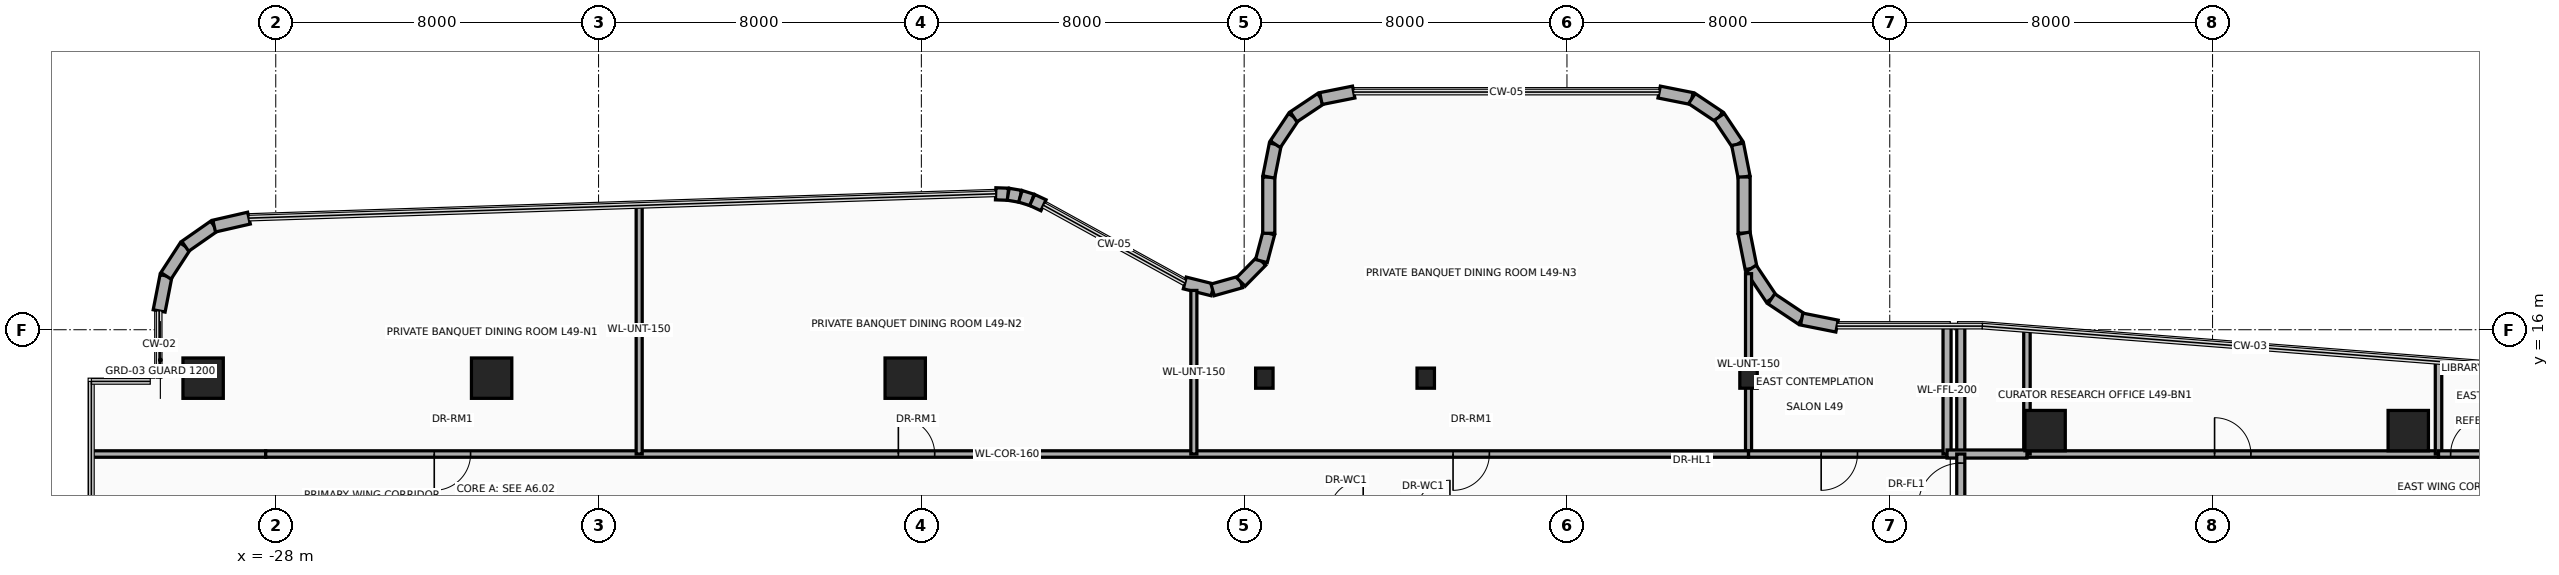
"""IFC4 building model, lengths in metres.
Left out: names, types, materials, properties, quantities, classifications, styles, units other than length and angle.
Written with IfcOpenShell. Run it as: python <this file> out.ifc"""

import sys

from ifc_helpers import new_model, si_unit, direction, frame, frame_2d, origin, origin_2d, place, context, subcontext, project, spatial, rectangle, i_section, extrude, source, transform, mapped, element, fill, save


model = new_model("IFC4")
c1 = context("Model", 3, precision=1e-05, world=origin(), true_north=direction((0.0, 1.0)))
c2 = subcontext(c1, "Body", "Model", "MODEL_VIEW")
j1 = project(units=[si_unit("LENGTHUNIT", "METRE"), si_unit("PLANEANGLEUNIT", "RADIAN")], contexts=[c1])
p1 = place(None, origin())
s1 = spatial("IfcSite", under=j1, at=p1, CompositionType="ELEMENT")
p2 = place(p1, origin())
s2 = spatial("IfcBuilding", under=s1, at=p2, CompositionType="ELEMENT")
p3 = place(p2, frame((0.0, 0.0, 192.35)))
s3 = spatial("IfcBuildingStorey", under=s2, at=p3, CompositionType="ELEMENT", Elevation=192.35)
m1 = source(origin(), c2, "Body", "SweptSolid", [
    extrude(rectangle(XDim=1.0, YDim=1.0, at=origin_2d()), origin(), (0.0, 0.0, 1.0), 3.95),
])
for number, where, z_axis, x_axis in (
    (1, (-29.8, 14.8, 0.0), (0.0, 0.0, 1.0), (1.0, 0.0, 0.0)),
    (2, (-22.65, 14.8, 0.0), (0.0, 0.0, 1.0), (1.0, 0.0, 0.0)),
    (3, (-12.4, 14.8, 0.0), (0.0, 0.0, 1.0), (1.0, 0.0, 0.0)),
    (4, (15.85, 13.5, 0.0), (0.0, 0.0, 1.0), (1.0, 0.0, 0.0)),
    (5, (24.85, 13.5, 0.0), (0.0, 0.0, 1.0), (1.0, 0.0, 0.0)),
):
    element("IfcColumn", number, at=place(p3, frame(where, z_axis=z_axis, x_axis=x_axis)), inside=s3, PredefinedType="COLUMN", context=c2, shape_type="MappedRepresentation", body=[
        mapped(m1, transform((0.0, 0.0, 0.0), x_axis=(1.0, 0.0, 0.0), y_axis=(0.0, 1.0, 0.0), z_axis=(0.0, 0.0, 1.0), scale=1.0)),
    ])
m2 = source(origin(), c2, "Body", "SweptSolid", [
    extrude(i_section(OverallWidth=0.432, OverallDepth=0.498, WebThickness=0.056, FlangeThickness=0.089, at=origin_2d()), origin(), (0.0, 0.0, 1.0), 3.95),
])
for number, where, z_axis, x_axis in (
    (6, (-3.5, 14.8, 0.0), (0.0, 0.0, 1.0), (1.0, 0.0, 0.0)),
    (7, (8.5, 14.8, 0.0), (0.0, 0.0, 1.0), (1.0, 0.0, 0.0)),
    (8, (0.5, 14.8, 0.0), (0.0, 0.0, 1.0), (1.0, 0.0, 0.0)),
):
    element("IfcColumn", number, at=place(p3, frame(where, z_axis=z_axis, x_axis=x_axis)), inside=s3, PredefinedType="COLUMN", context=c2, shape_type="MappedRepresentation", body=[
        mapped(m2, transform((0.0, 0.0, 0.0), x_axis=(1.0, 0.0, 0.0), y_axis=(0.0, 1.0, 0.0), z_axis=(0.0, 0.0, 1.0), scale=1.0)),
    ])
p4 = place(p3, frame((-30.89, 16.466, 0.0), z_axis=(0.0, 0.0, 1.0), x_axis=(0.191128020887, 0.981565117367, 0.0)))
e9 = element("IfcWall", 9, at=p4, inside=s3, PredefinedType="SOLIDWALL", context=c2, shape_type="SweptSolid", body=[
    extrude(rectangle(XDim=0.885, YDim=0.3, at=frame_2d((0.443, 0.0))), origin(), (0.0, 0.0, 1.0), 3.71),
])
p5 = place(p3, frame((-30.721, 17.335, 0.0), z_axis=(0.0, 0.0, 1.0), x_axis=(0.545322000684, 0.838226649284, 0.0)))
e10 = element("IfcWall", 10, at=p5, inside=s3, PredefinedType="SOLIDWALL", context=c2, shape_type="SweptSolid", body=[
    extrude(rectangle(XDim=0.874, YDim=0.3, at=frame_2d((0.437, 0.0))), origin(), (0.0, 0.0, 1.0), 3.71),
])
p6 = place(p3, frame((-30.244, 18.068, 0.0), z_axis=(0.0, 0.0, 1.0), x_axis=(0.820005059444, 0.572356272339, 0.0)))
e11 = element("IfcWall", 11, at=p6, inside=s3, PredefinedType="SOLIDWALL", context=c2, shape_type="SweptSolid", body=[
    extrude(rectangle(XDim=0.875, YDim=0.3, at=frame_2d((0.437, 0.0))), origin(), (0.0, 0.0, 1.0), 3.71),
])
p7 = place(p3, frame((-29.527, 18.569, 0.0), z_axis=(0.0, 0.0, 1.0), x_axis=(0.974798570829, 0.223086858218, 0.0)))
e12 = element("IfcWall", 12, at=p7, inside=s3, PredefinedType="SOLIDWALL", context=c2, shape_type="SweptSolid", body=[
    extrude(rectangle(XDim=0.885, YDim=0.3, at=frame_2d((0.443, 0.0))), origin(), (0.0, 0.0, 1.0), 3.71),
])
p8 = place(p3, frame((-10.158, 19.368, 0.0), z_axis=(0.0, 0.0, 1.0), x_axis=(0.999425494718, -0.03389218949, 0.0)))
e13 = element("IfcWall", 13, at=p8, inside=s3, PredefinedType="SOLIDWALL", context=c2, shape_type="SweptSolid", body=[
    extrude(rectangle(XDim=0.31, YDim=0.3, at=frame_2d((0.155, 0.0))), origin(), (0.0, 0.0, 1.0), 3.71),
])
for number, where, z_axis, x_axis in (
    (14, (-9.848, 19.358, 0.0), (0.0, 0.0, 1.0), (0.986, -0.167, 0.0)),
    (15, (-9.546, 19.307, 0.0), (0.0, 0.0, 1.0), (0.955, -0.297, 0.0)),
):
    element("IfcWall", number, at=place(p3, frame(where, z_axis=z_axis, x_axis=x_axis)), inside=s3, PredefinedType="SOLIDWALL", context=c2, shape_type="SweptSolid", body=[
        extrude(rectangle(XDim=0.306, YDim=0.3, at=frame_2d((0.153, 0.0))), origin(), (0.0, 0.0, 1.0), 3.71),
    ])
p9 = place(p3, frame((-9.254, 19.216, 0.0), z_axis=(0.0, 0.0, 1.0), x_axis=(0.906524902388, -0.42215234377, 0.0)))
e16 = element("IfcWall", 16, at=p9, inside=s3, PredefinedType="SOLIDWALL", context=c2, shape_type="SweptSolid", body=[
    extrude(rectangle(XDim=0.31, YDim=0.3, at=frame_2d((0.155, 0.0))), origin(), (0.0, 0.0, 1.0), 3.71),
])
p10 = place(p3, frame((-5.472, 17.159, 0.0), z_axis=(0.0, 0.0, 1.0), x_axis=(0.970564820059, -0.240840050789, 0.0)))
e17 = element("IfcWall", 17, at=p10, inside=s3, PredefinedType="SOLIDWALL", context=c2, shape_type="SweptSolid", body=[
    extrude(rectangle(XDim=0.712, YDim=0.3, at=frame_2d((0.356, 0.0))), origin(), (0.0, 0.0, 1.0), 3.71),
])
p11 = place(p3, frame((-4.781, 16.987, 0.0), z_axis=(0.0, 0.0, 1.0), x_axis=(0.962494705656, 0.271300463662, 0.0)))
e18 = element("IfcWall", 18, at=p11, inside=s3, PredefinedType="SOLIDWALL", context=c2, shape_type="SweptSolid", body=[
    extrude(rectangle(XDim=0.726, YDim=0.3, at=frame_2d((0.363, 0.0))), origin(), (0.0, 0.0, 1.0), 3.71),
])
p12 = place(p3, frame((-4.082, 17.184, 0.0), z_axis=(0.0, 0.0, 1.0), x_axis=(0.701538604215, 0.712631452293, 0.0)))
e19 = element("IfcWall", 19, at=p12, inside=s3, PredefinedType="SOLIDWALL", context=c2, shape_type="SweptSolid", body=[
    extrude(rectangle(XDim=0.726, YDim=0.3, at=frame_2d((0.363, 0.0))), origin(), (0.0, 0.0, 1.0), 2.695),
])
p13 = place(p3, frame((-3.573, 17.702, 0.0), z_axis=(0.0, 0.0, 1.0), x_axis=(0.256637481794, 0.966507735581, 0.0)))
e20 = element("IfcWall", 20, at=p13, inside=s3, PredefinedType="SOLIDWALL", context=c2, shape_type="SweptSolid", body=[
    extrude(rectangle(XDim=0.712, YDim=0.3, at=frame_2d((0.356, 0.0))), origin(), (0.0, 0.0, 1.0), 2.695),
])
p14 = place(p3, frame((-3.39, 18.39, 0.0), z_axis=(0.0, 0.0, 1.0), x_axis=(0.0, 1.0, 0.0)))
e21 = element("IfcWall", 21, at=p14, inside=s3, PredefinedType="SOLIDWALL", context=c2, shape_type="SweptSolid", body=[
    extrude(rectangle(XDim=1.396, YDim=0.3, at=frame_2d((0.698, 0.0))), origin(), (0.0, 0.0, 1.0), 2.695),
])
p15 = place(p3, frame((-3.39, 19.785, 0.0), z_axis=(0.0, 0.0, 1.0), x_axis=(0.195094354541, 0.980784478276, 0.0)))
e22 = element("IfcWall", 22, at=p15, inside=s3, PredefinedType="SOLIDWALL", context=c2, shape_type="SweptSolid", body=[
    extrude(rectangle(XDim=0.827, YDim=0.3, at=frame_2d((0.414, 0.0))), origin(), (0.0, 0.0, 1.0), 2.695),
])
p16 = place(p3, frame((-3.229, 20.596, 0.0), z_axis=(0.0, 0.0, 1.0), x_axis=(0.55545926088, 0.831543750805, 0.0)))
e23 = element("IfcWall", 23, at=p16, inside=s3, PredefinedType="SOLIDWALL", context=c2, shape_type="SweptSolid", body=[
    extrude(rectangle(XDim=0.816, YDim=0.3, at=frame_2d((0.408, 0.0))), origin(), (0.0, 0.0, 1.0), 2.695),
])
p17 = place(p3, frame((-2.775, 21.275, 0.0), z_axis=(0.0, 0.0, 1.0), x_axis=(0.831543750805, 0.55545926088, 0.0)))
e24 = element("IfcWall", 24, at=p17, inside=s3, PredefinedType="SOLIDWALL", context=c2, shape_type="SweptSolid", body=[
    extrude(rectangle(XDim=0.816, YDim=0.3, at=frame_2d((0.408, 0.0))), origin(), (0.0, 0.0, 1.0), 3.71),
])
for number, where, z_axis, x_axis in (
    (25, (-2.096, 21.729, 0.0), (0.0, 0.0, 1.0), (0.981, 0.195, 0.0)),
    (26, (6.285, 21.89, 0.0), (0.0, 0.0, 1.0), (0.981, -0.195, 0.0)),
):
    element("IfcWall", number, at=place(p3, frame(where, z_axis=z_axis, x_axis=x_axis)), inside=s3, PredefinedType="SOLIDWALL", context=c2, shape_type="SweptSolid", body=[
        extrude(rectangle(XDim=0.827, YDim=0.3, at=frame_2d((0.414, 0.0))), origin(), (0.0, 0.0, 1.0), 3.156),
    ])
p18 = place(p3, frame((7.096, 21.729, 0.0), z_axis=(0.0, 0.0, 1.0), x_axis=(0.831543750805, -0.55545926088, 0.0)))
e27 = element("IfcWall", 27, at=p18, inside=s3, PredefinedType="SOLIDWALL", context=c2, shape_type="SweptSolid", body=[
    extrude(rectangle(XDim=0.816, YDim=0.3, at=frame_2d((0.408, 0.0))), origin(), (0.0, 0.0, 1.0), 3.71),
])
p19 = place(p3, frame((7.775, 21.275, 0.0), z_axis=(0.0, 0.0, 1.0), x_axis=(0.55545926088, -0.831543750805, 0.0)))
e28 = element("IfcWall", 28, at=p19, inside=s3, PredefinedType="SOLIDWALL", context=c2, shape_type="SweptSolid", body=[
    extrude(rectangle(XDim=0.816, YDim=0.3, at=frame_2d((0.408, 0.0))), origin(), (0.0, 0.0, 1.0), 2.695),
])
p20 = place(p3, frame((8.229, 20.596, 0.0), z_axis=(0.0, 0.0, 1.0), x_axis=(0.195094354541, -0.980784478276, 0.0)))
e29 = element("IfcWall", 29, at=p20, inside=s3, PredefinedType="SOLIDWALL", context=c2, shape_type="SweptSolid", body=[
    extrude(rectangle(XDim=0.827, YDim=0.3, at=frame_2d((0.414, 0.0))), origin(), (0.0, 0.0, 1.0), 2.695),
])
p21 = place(p3, frame((8.39, 19.785, 0.0), z_axis=(0.0, 0.0, 1.0), x_axis=(0.0, -1.0, 0.0)))
e30 = element("IfcWall", 30, at=p21, inside=s3, PredefinedType="SOLIDWALL", context=c2, shape_type="SweptSolid", body=[
    extrude(rectangle(XDim=1.392, YDim=0.3, at=frame_2d((0.696, 0.0))), origin(), (0.0, 0.0, 1.0), 2.695),
])
p22 = place(p3, frame((8.39, 18.393, 0.0), z_axis=(0.0, 0.0, 1.0), x_axis=(0.195222179208, -0.980759043163, 0.0)))
e31 = element("IfcWall", 31, at=p22, inside=s3, PredefinedType="SOLIDWALL", context=c2, shape_type="SweptSolid", body=[
    extrude(rectangle(XDim=0.893, YDim=0.3, at=frame_2d((0.446, 0.0))), origin(), (0.0, 0.0, 1.0), 2.695),
])
for number, where, z_axis, x_axis in (
    (32, (8.564, 17.518, 0.0), (0.0, 0.0, 1.0), (0.555, -0.832, 0.0)),
    (33, (9.066, 16.766, 0.0), (0.0, 0.0, 1.0), (0.832, -0.555, 0.0)),
):
    element("IfcWall", number, at=place(p3, frame(where, z_axis=z_axis, x_axis=x_axis)), inside=s3, PredefinedType="SOLIDWALL", context=c2, shape_type="SweptSolid", body=[
        extrude(rectangle(XDim=0.904, YDim=0.3, at=frame_2d((0.452, 0.0))), origin(), (0.0, 0.0, 1.0), 2.695),
    ])
p23 = place(p3, frame((9.818, 16.264, 0.0), z_axis=(0.0, 0.0, 1.0), x_axis=(0.980800964186, -0.195011457743, 0.0)))
e34 = element("IfcWall", 34, at=p23, inside=s3, PredefinedType="SOLIDWALL", context=c2, shape_type="SweptSolid", body=[
    extrude(rectangle(XDim=0.893, YDim=0.3, at=frame_2d((0.446, 0.0))), origin(), (0.0, 0.0, 1.0), 3.71),
])
p24 = place(p3, frame((8.5, 12.92, 0.0), z_axis=(0.0, 0.0, 1.0), x_axis=(0.0, 1.0, 0.0)))
e35 = element("IfcWall", 35, at=p24, inside=s3, PredefinedType="PARTITIONING", context=c2, shape_type="SweptSolid", body=[
    extrude(rectangle(XDim=4.469, YDim=0.15, at=frame_2d((2.234, 0.0))), origin(), (0.0, 0.0, 1.0), 2.695),
])
p25 = place(p3, frame((-32.54, 12.92, 0.0), z_axis=(0.0, 0.0, 1.0), x_axis=(1.0, 0.0, 0.0)))
e36 = element("IfcWall", 36, at=p25, inside=s3, PredefinedType="PARTITIONING", context=c2, shape_type="SweptSolid", body=[
    extrude(rectangle(XDim=4.29, YDim=0.16, at=frame_2d((2.145, 0.0))), origin(), (0.0, 0.0, 1.0), 3.156),
])
p26 = place(p3, frame((-28.25, 12.92, 0.0), z_axis=(0.0, 0.0, 1.0), x_axis=(1.0, 0.0, 0.0)))
e37 = element("IfcWall", 37, at=p26, inside=s3, PredefinedType="PARTITIONING", context=c2, shape_type="SweptSolid", body=[
    extrude(rectangle(XDim=36.75, YDim=0.16, at=frame_2d((18.375, 0.0))), origin(), (0.0, 0.0, 1.0), 2.695),
])
p27 = place(p26, frame((4.178, 0.0, 0.0)))
e38 = element("IfcOpeningElement", 38, at=p27, cuts=e37, PredefinedType="OPENING", context=c2, shape_type="SweptSolid", body=[
    extrude(rectangle(XDim=0.9, YDim=2.1, at=frame_2d((0.45, 1.05))), frame((0.0, 0.095, 0.0), z_axis=(0.0, -1.0, 0.0), x_axis=(1.0, 0.0, 0.0)), (0.0, 0.0, 1.0), 0.19),
])
p28 = place(p26, frame((15.68, 0.0, 0.0)))
e39 = element("IfcOpeningElement", 39, at=p28, cuts=e37, PredefinedType="OPENING", context=c2, shape_type="SweptSolid", body=[
    extrude(rectangle(XDim=0.9, YDim=2.1, at=frame_2d((0.45, 1.05))), frame((0.0, 0.095, 0.0), z_axis=(0.0, -1.0, 0.0), x_axis=(1.0, 0.0, 0.0)), (0.0, 0.0, 1.0), 0.19),
])
p29 = place(p26, frame((29.427, 0.0, 0.0)))
e40 = element("IfcOpeningElement", 40, at=p29, cuts=e37, PredefinedType="OPENING", context=c2, shape_type="SweptSolid", body=[
    extrude(rectangle(XDim=0.9, YDim=2.1, at=frame_2d((0.45, 1.05))), frame((0.0, 0.095, 0.0), z_axis=(0.0, -1.0, 0.0), x_axis=(1.0, 0.0, 0.0)), (0.0, 0.0, 1.0), 0.19),
])
p30 = place(p3, frame((-18.993, 12.92, 0.0), z_axis=(0.0, 0.0, 1.0), x_axis=(0.0, 1.0, 0.0)))
e41 = element("IfcWall", 41, at=p30, inside=s3, PredefinedType="PARTITIONING", context=c2, shape_type="SweptSolid", body=[
    extrude(rectangle(XDim=6.161, YDim=0.15, at=frame_2d((3.081, 0.0))), origin(), (0.0, 0.0, 1.0), 2.994),
])
p31 = place(p3, frame((-5.247, 12.92, 0.0), z_axis=(0.0, 0.0, 1.0), x_axis=(0.0, 1.0, 0.0)))
e42 = element("IfcWall", 42, at=p31, inside=s3, PredefinedType="PARTITIONING", context=c2, shape_type="SweptSolid", body=[
    extrude(rectangle(XDim=4.054, YDim=0.15, at=frame_2d((2.027, 0.0))), origin(), (0.0, 0.0, 1.0), 2.495),
])
p32 = place(p3, frame((8.5, 12.92, 0.0), z_axis=(0.0, 0.0, 1.0), x_axis=(1.0, 0.0, 0.0)))
e43 = element("IfcWall", 43, at=p32, inside=s3, PredefinedType="PARTITIONING", context=c2, shape_type="SweptSolid", body=[
    extrude(rectangle(XDim=4.92, YDim=0.16, at=frame_2d((2.46, 0.0))), origin(), (0.0, 0.0, 1.0), 2.695),
])
p33 = place(p32, frame((1.8, 0.0, 0.0)))
e44 = element("IfcOpeningElement", 44, at=p33, cuts=e43, PredefinedType="OPENING", context=c2, shape_type="SweptSolid", body=[
    extrude(rectangle(XDim=0.9, YDim=2.1, at=frame_2d((0.45, 1.05))), frame((0.0, 0.095, 0.0), z_axis=(0.0, -1.0, 0.0), x_axis=(1.0, 0.0, 0.0)), (0.0, 0.0, 1.0), 0.19),
])
for number, where, z_axis, x_axis in (
    (45, (13.42, 12.92, 0.0), (0.0, 0.0, 1.0), (0.0, 1.0, 0.0)),
    (46, (13.76, 12.92, 0.0), (0.0, 0.0, 1.0), (0.0, 1.0, 0.0)),
):
    element("IfcWall", number, at=place(p3, frame(where, z_axis=z_axis, x_axis=x_axis)), inside=s3, PredefinedType="PARTITIONING", context=c2, shape_type="SweptSolid", body=[
        extrude(rectangle(XDim=3.17, YDim=0.2, at=frame_2d((1.585, 0.0))), origin(), (0.0, 0.0, 1.0), 2.994),
    ])
p34 = place(p3, frame((15.4, 12.92, 0.0), z_axis=(0.0, 0.0, 1.0), x_axis=(1.0, 0.0, 0.0)))
e47 = element("IfcWall", 47, at=p34, inside=s3, PredefinedType="PARTITIONING", context=c2, shape_type="SweptSolid", body=[
    extrude(rectangle(XDim=10.2, YDim=0.16, at=frame_2d((5.1, 0.0))), origin(), (0.0, 0.0, 1.0), 3.084),
])
p35 = place(p34, frame((4.65, 0.0, 0.0)))
e48 = element("IfcOpeningElement", 48, at=p35, cuts=e47, PredefinedType="OPENING", context=c2, shape_type="SweptSolid", body=[
    extrude(rectangle(XDim=0.9, YDim=2.1, at=frame_2d((0.45, 1.05))), frame((0.0, 0.095, 0.0), z_axis=(0.0, -1.0, 0.0), x_axis=(1.0, 0.0, 0.0)), (0.0, 0.0, 1.0), 0.19),
])
p36 = place(p3, frame((15.4, 12.92, 0.0), z_axis=(0.0, 0.0, 1.0), x_axis=(0.0, 1.0, 0.0)))
e49 = element("IfcWall", 49, at=p36, inside=s3, PredefinedType="PARTITIONING", context=c2, shape_type="SweptSolid", body=[
    extrude(rectangle(XDim=3.084, YDim=0.16, at=frame_2d((1.542, 0.0))), origin(), (0.0, 0.0, 1.0), 2.994),
])
p37 = place(p3, frame((25.6, 12.92, 0.0), z_axis=(0.0, 0.0, 1.0), x_axis=(0.0, 1.0, 0.0)))
e50 = element("IfcWall", 50, at=p37, inside=s3, PredefinedType="PARTITIONING", context=c2, shape_type="SweptSolid", body=[
    extrude(rectangle(XDim=2.295, YDim=0.16, at=frame_2d((1.147, 0.0))), origin(), (0.0, 0.0, 1.0), 2.994),
])
p38 = place(p3, frame((25.6, 12.92, 0.0), z_axis=(0.0, 0.0, 1.0), x_axis=(1.0, 0.0, 0.0)))
e51 = element("IfcWall", 51, at=p38, inside=s3, PredefinedType="PARTITIONING", context=c2, shape_type="SweptSolid", body=[
    extrude(rectangle(XDim=3.934, YDim=0.16, at=frame_2d((1.967, 0.0))), origin(), (0.0, 0.0, 1.0), 3.156),
])
p39 = place(p38, frame((0.3, 0.0, 0.0)))
e52 = element("IfcOpeningElement", 52, at=p39, cuts=e51, PredefinedType="OPENING", context=c2, shape_type="SweptSolid", body=[
    extrude(rectangle(XDim=0.9, YDim=2.1, at=frame_2d((0.45, 1.05))), frame((0.0, 0.095, 0.0), z_axis=(0.0, -1.0, 0.0), x_axis=(1.0, 0.0, 0.0)), (0.0, 0.0, 1.0), 0.19),
])
p40 = place(p3, frame((13.42, 12.92, 0.0), z_axis=(0.0, 0.0, 1.0), x_axis=(1.0, 0.0, 0.0)))
e53 = element("IfcWall", 53, at=p40, inside=s3, PredefinedType="PARTITIONING", context=c2, shape_type="SweptSolid", body=[
    extrude(rectangle(XDim=1.98, YDim=0.2, at=frame_2d((0.99, 0.0))), origin(), (0.0, 0.0, 1.0), 3.71),
])
p41 = place(p3, frame((13.76, 11.42, 0.0), z_axis=(0.0, 0.0, 1.0), x_axis=(0.0, 1.0, 0.0)))
e54 = element("IfcWall", 54, at=p41, inside=s3, PredefinedType="PARTITIONING", context=c2, shape_type="SweptSolid", body=[
    extrude(rectangle(XDim=1.5, YDim=0.2, at=frame_2d((0.75, 0.0))), origin(), (0.0, 0.0, 1.0), 3.71),
])
p42 = place(p41, frame((0.225, 0.0, 0.0)))
e55 = element("IfcOpeningElement", 55, at=p42, cuts=e54, PredefinedType="OPENING", context=c2, shape_type="SweptSolid", body=[
    extrude(rectangle(XDim=1.05, YDim=2.15, at=frame_2d((0.525, 1.075))), frame((0.0, 0.115, 0.0), z_axis=(0.0, -1.0, 0.0), x_axis=(1.0, 0.0, 0.0)), (0.0, 0.0, 1.0), 0.23),
])
p43 = place(p27, frame((0.9, 0.0, 0.0), z_axis=(0.0, 0.0, 1.0), x_axis=(-1.0, 0.0, 0.0)))
e56 = element("IfcDoor", 56, at=p43, inside=s3, OperationType="SINGLE_SWING_LEFT", PredefinedType="DOOR", context=c2, shape_type="SweptSolid", body=[
    extrude(rectangle(XDim=0.9, YDim=2.1, at=frame_2d((0.45, 1.05))), frame((0.0, 0.025, 0.0), z_axis=(0.0, -1.0, 0.0), x_axis=(1.0, 0.0, 0.0)), (0.0, 0.0, 1.0), 0.05),
])
fill(e38, e56)
p44 = place(p28, origin())
e57 = element("IfcDoor", 57, at=p44, inside=s3, OperationType="SINGLE_SWING_RIGHT", PredefinedType="DOOR", context=c2, shape_type="SweptSolid", body=[
    extrude(rectangle(XDim=0.9, YDim=2.1, at=frame_2d((0.45, 1.05))), frame((0.0, 0.025, 0.0), z_axis=(0.0, -1.0, 0.0), x_axis=(1.0, 0.0, 0.0)), (0.0, 0.0, 1.0), 0.05),
])
fill(e39, e57)
p45 = place(p29, frame((0.9, 0.0, 0.0), z_axis=(0.0, 0.0, 1.0), x_axis=(-1.0, 0.0, 0.0)))
e58 = element("IfcDoor", 58, at=p45, inside=s3, OperationType="SINGLE_SWING_LEFT", PredefinedType="DOOR", context=c2, shape_type="SweptSolid", body=[
    extrude(rectangle(XDim=0.9, YDim=2.1, at=frame_2d((0.45, 1.05))), frame((0.0, 0.025, 0.0), z_axis=(0.0, -1.0, 0.0), x_axis=(1.0, 0.0, 0.0)), (0.0, 0.0, 1.0), 0.05),
])
fill(e40, e58)
p46 = place(p33, frame((0.9, 0.0, 0.0), z_axis=(0.0, 0.0, 1.0), x_axis=(-1.0, 0.0, 0.0)))
e59 = element("IfcDoor", 59, at=p46, inside=s3, OperationType="SINGLE_SWING_LEFT", PredefinedType="DOOR", context=c2, shape_type="SweptSolid", body=[
    extrude(rectangle(XDim=0.9, YDim=2.1, at=frame_2d((0.45, 1.05))), frame((0.0, 0.025, 0.0), z_axis=(0.0, -1.0, 0.0), x_axis=(1.0, 0.0, 0.0)), (0.0, 0.0, 1.0), 0.05),
])
fill(e44, e59)
p47 = place(p35, origin())
e60 = element("IfcDoor", 60, at=p47, inside=s3, OperationType="SINGLE_SWING_RIGHT", PredefinedType="DOOR", context=c2, shape_type="SweptSolid", body=[
    extrude(rectangle(XDim=0.9, YDim=2.1, at=frame_2d((0.45, 1.05))), frame((0.0, 0.025, 0.0), z_axis=(0.0, -1.0, 0.0), x_axis=(1.0, 0.0, 0.0)), (0.0, 0.0, 1.0), 0.05),
])
fill(e48, e60)
p48 = place(p39, origin())
e61 = element("IfcDoor", 61, at=p48, inside=s3, OperationType="SINGLE_SWING_RIGHT", PredefinedType="DOOR", context=c2, shape_type="SweptSolid", body=[
    extrude(rectangle(XDim=0.9, YDim=2.1, at=frame_2d((0.45, 1.05))), frame((0.0, 0.025, 0.0), z_axis=(0.0, -1.0, 0.0), x_axis=(1.0, 0.0, 0.0)), (0.0, 0.0, 1.0), 0.05),
])
fill(e52, e61)
p49 = place(p42, origin())
e62 = element("IfcDoor", 62, at=p49, inside=s3, OperationType="SINGLE_SWING_RIGHT", PredefinedType="DOOR", context=c2, shape_type="SweptSolid", body=[
    extrude(rectangle(XDim=1.05, YDim=2.15, at=frame_2d((0.525, 1.075))), frame((0.0, 0.025, 0.0), z_axis=(0.0, -1.0, 0.0), x_axis=(1.0, 0.0, 0.0)), (0.0, 0.0, 1.0), 0.05),
])
fill(e55, e62)
save(model, sys.argv[1])
